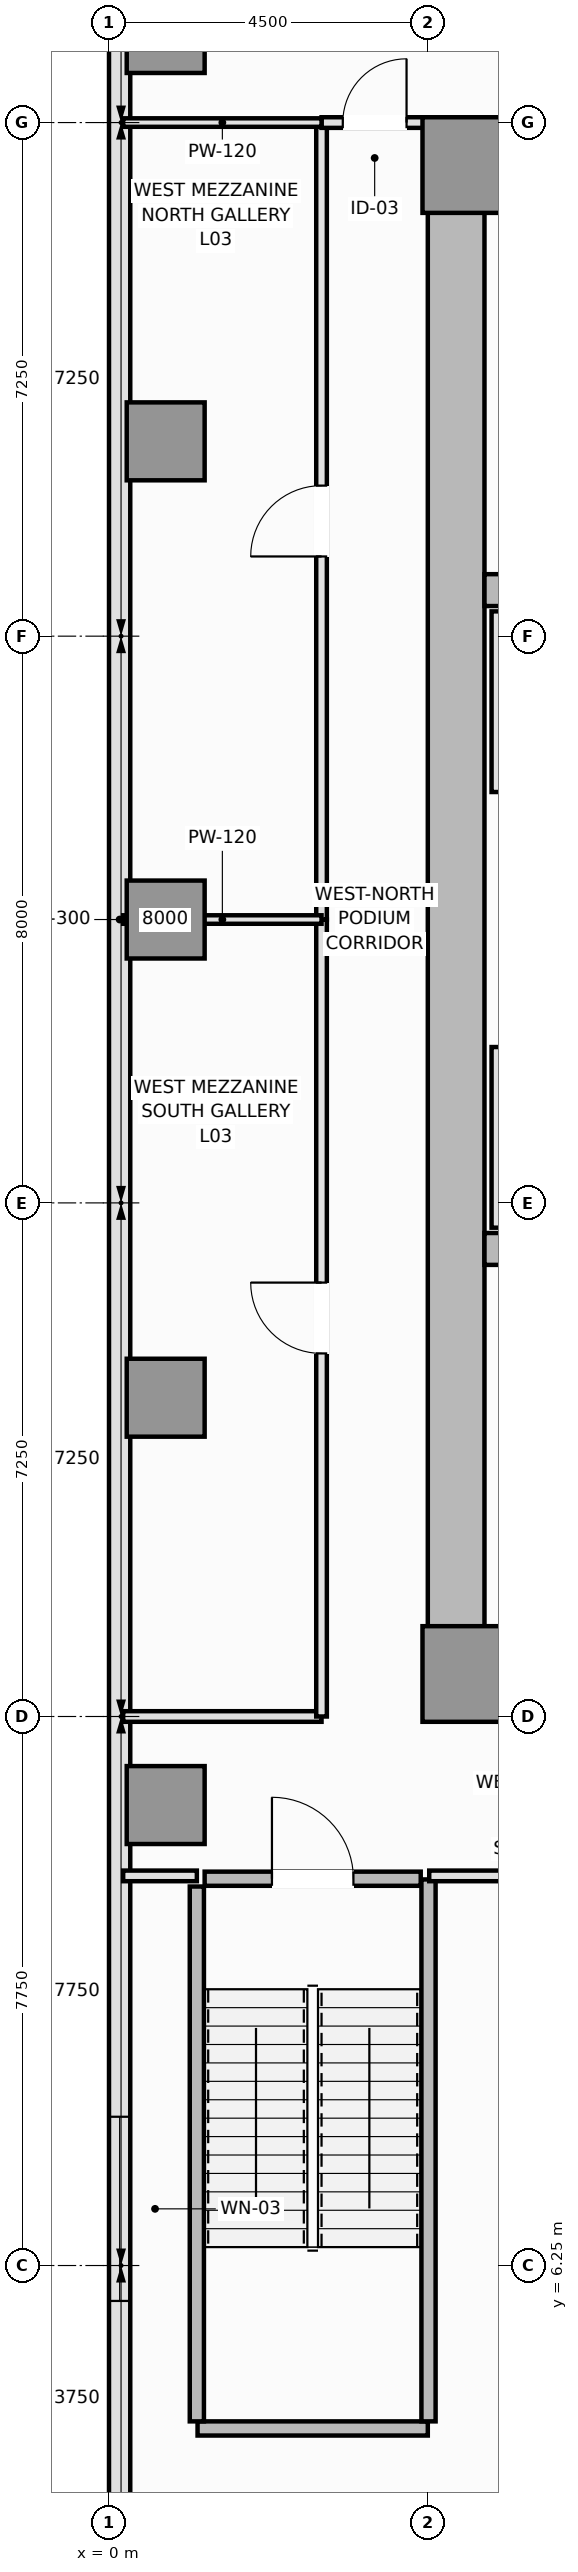
"""IFC4 building model, lengths in metres.
Left out: names, types, materials, properties, quantities, classifications, styles, units other than length and angle.
Written with IfcOpenShell. Run it as: python <this file> out.ifc"""

import sys

from ifc_helpers import new_model, si_unit, direction, frame, frame_2d, origin, origin_2d, place, context, subcontext, project, spatial, rectangle, extrude, element, fill, save


model = new_model("IFC4")
c1 = context("Model", 3, precision=1e-05, world=origin(), true_north=direction((0.0, 1.0)))
c2 = subcontext(c1, "Body", "Model", "MODEL_VIEW")
j1 = project(units=[si_unit("LENGTHUNIT", "METRE"), si_unit("PLANEANGLEUNIT", "RADIAN")], contexts=[c1])
p1 = place(None, origin())
s1 = spatial("IfcSite", under=j1, at=p1, CompositionType="ELEMENT")
p2 = place(p1, origin())
s2 = spatial("IfcBuilding", under=s1, at=p2, CompositionType="ELEMENT")
p3 = place(p2, frame((0.0, 0.0, 15.6)))
s3 = spatial("IfcBuildingStorey", under=s2, at=p3, CompositionType="ELEMENT", Elevation=15.6)
for number, where, z_axis, x_axis in (
    (1, (4.5, 14.4, 0.0), (0.0, 0.0, 1.0), (1.0, 0.0, 0.0)),
    (2, (4.5, 36.1, 0.0), (0.0, 0.0, 1.0), (1.0, 0.0, 0.0)),
):
    element("IfcWall", number, at=place(p3, frame(where, z_axis=z_axis, x_axis=x_axis)), inside=s3, PredefinedType="SHEAR", context=c2, shape_type="SweptSolid", body=[
        extrude(rectangle(XDim=13.5, YDim=0.8, at=frame_2d((6.75, 0.0))), origin(), (0.0, 0.0, 1.0), 4.8),
    ])
p4 = place(p3, frame((4.9, 14.8, 0.0), z_axis=(0.0, 0.0, 1.0), x_axis=(0.0, 1.0, 0.0)))
e3 = element("IfcWall", 3, at=p4, inside=s3, PredefinedType="SHEAR", context=c2, shape_type="SweptSolid", body=[
    extrude(rectangle(XDim=20.9, YDim=0.8, at=frame_2d((10.45, 0.0))), origin(), (0.0, 0.0, 1.0), 4.8),
])
for number, where, z_axis, x_axis in (
    (4, (5.3, 20.6, 0.0), (0.0, 0.0, 1.0), (1.0, 0.0, 0.0)),
    (5, (5.3, 29.9, 0.0), (0.0, 0.0, 1.0), (1.0, 0.0, 0.0)),
):
    element("IfcWall", number, at=place(p3, frame(where, z_axis=z_axis, x_axis=x_axis)), inside=s3, PredefinedType="SHEAR", context=c2, shape_type="SweptSolid", body=[
        extrude(rectangle(XDim=11.9, YDim=0.45, at=frame_2d((5.95, 0.0))), origin(), (0.0, 0.0, 1.0), 4.8),
    ])
for number, where, z_axis, x_axis in (
    (6, (5.1, 14.6, 0.0), (0.0, 0.0, 1.0), (1.0, 0.0, 0.0)),
    (7, (5.1, 35.9, 0.0), (0.0, 0.0, 1.0), (1.0, 0.0, 0.0)),
):
    element("IfcColumn", number, at=place(p3, frame(where, z_axis=z_axis, x_axis=x_axis)), inside=s3, PredefinedType="PILASTER", context=c2, shape_type="SweptSolid", body=[
        extrude(rectangle(XDim=1.35, YDim=1.35, at=origin_2d()), origin(), (0.0, 0.0, 1.0), 4.8),
    ])
for number, where, z_axis, x_axis in (
    (8, (0.8, 12.75, 0.0), (0.0, 0.0, 1.0), (1.0, 0.0, 0.0)),
    (9, (0.8, 18.5, 0.0), (0.0, 0.0, 1.0), (1.0, 0.0, 0.0)),
    (10, (0.8, 25.25, 0.0), (0.0, 0.0, 1.0), (1.0, 0.0, 0.0)),
    (11, (0.8, 32.0, 0.0), (0.0, 0.0, 1.0), (1.0, 0.0, 0.0)),
    (12, (0.8, 37.75, 0.0), (0.0, 0.0, 1.0), (1.0, 0.0, 0.0)),
):
    element("IfcColumn", number, at=place(p3, frame(where, z_axis=z_axis, x_axis=x_axis)), inside=s3, PredefinedType="COLUMN", context=c2, shape_type="SweptSolid", body=[
        extrude(rectangle(XDim=1.1, YDim=1.1, at=origin_2d()), origin(), (0.0, 0.0, 1.0), 4.8),
    ])
p5 = place(p3, frame((0.15, 50.35, 0.0), z_axis=(0.0, 0.0, 1.0), x_axis=(0.0, -1.0, 0.0)))
e13 = element("IfcWall", 13, at=p5, inside=s3, PredefinedType="SOLIDWALL", context=c2, shape_type="SweptSolid", body=[
    extrude(rectangle(XDim=50.2, YDim=0.3, at=frame_2d((25.1, 0.0))), origin(), (0.0, 0.0, 1.0), 4.6),
])
p6 = place(p5, frame((6.5, 0.0, 0.9)))
e14 = element("IfcOpeningElement", 14, at=p6, cuts=e13, PredefinedType="OPENING", context=c2, shape_type="SweptSolid", body=[
    extrude(rectangle(XDim=2.6, YDim=2.2, at=frame_2d((1.3, 1.1))), frame((0.0, 0.16, 0.0), z_axis=(0.0, -1.0, 0.0), x_axis=(1.0, 0.0, 0.0)), (0.0, 0.0, 1.0), 0.32),
])
p7 = place(p5, frame((42.0, 0.0, 0.9)))
e15 = element("IfcOpeningElement", 15, at=p7, cuts=e13, PredefinedType="OPENING", context=c2, shape_type="SweptSolid", body=[
    extrude(rectangle(XDim=2.6, YDim=2.2, at=frame_2d((1.3, 1.1))), frame((0.0, 0.16, 0.0), z_axis=(0.0, -1.0, 0.0), x_axis=(1.0, 0.0, 0.0)), (0.0, 0.0, 1.0), 0.32),
])
p8 = place(p3, frame((1.25, 3.95, 0.0), z_axis=(0.0, 0.0, 1.0), x_axis=(1.0, 0.0, 0.0)))
e16 = element("IfcWall", 16, at=p8, inside=s3, PredefinedType="SOLIDWALL", context=c2, shape_type="SweptSolid", body=[
    extrude(rectangle(XDim=3.25, YDim=0.2, at=frame_2d((1.625, 0.0))), origin(), (0.0, 0.0, 1.0), 4.8),
])
p9 = place(p3, frame((1.24, 4.05, 0.0), z_axis=(0.0, 0.0, 1.0), x_axis=(0.0, 1.0, 0.0)))
e17 = element("IfcWall", 17, at=p9, inside=s3, PredefinedType="SOLIDWALL", context=c2, shape_type="SweptSolid", body=[
    extrude(rectangle(XDim=7.55, YDim=0.2, at=frame_2d((3.775, 0.0))), origin(), (0.0, 0.0, 1.0), 4.8),
])
p10 = place(p3, frame((4.51, 4.05, 0.0), z_axis=(0.0, 0.0, 1.0), x_axis=(0.0, 1.0, 0.0)))
e18 = element("IfcWall", 18, at=p10, inside=s3, PredefinedType="SOLIDWALL", context=c2, shape_type="SweptSolid", body=[
    extrude(rectangle(XDim=7.65, YDim=0.2, at=frame_2d((3.825, 0.0))), origin(), (0.0, 0.0, 1.0), 4.8),
])
p11 = place(p3, frame((1.35, 11.71, 0.0), z_axis=(0.0, 0.0, 1.0), x_axis=(1.0, 0.0, 0.0)))
e19 = element("IfcWall", 19, at=p11, inside=s3, PredefinedType="SOLIDWALL", context=c2, shape_type="SweptSolid", body=[
    extrude(rectangle(XDim=3.05, YDim=0.2, at=frame_2d((1.525, 0.0))), origin(), (0.0, 0.0, 1.0), 4.8),
])
p12 = place(p11, frame((0.95, 0.0, 0.0)))
e20 = element("IfcOpeningElement", 20, at=p12, cuts=e19, PredefinedType="OPENING", context=c2, shape_type="SweptSolid", body=[
    extrude(rectangle(XDim=1.15, YDim=2.15, at=frame_2d((0.575, 1.075))), frame((0.0, 0.11, 0.0), z_axis=(0.0, -1.0, 0.0), x_axis=(1.0, 0.0, 0.0)), (0.0, 0.0, 1.0), 0.22),
])
for number, where, z_axis, x_axis in (
    (21, (5.475, 20.9, 0.0), (0.0, 0.0, 1.0), (0.0, 1.0, 0.0)),
    (22, (5.475, 27.05, 0.0), (0.0, 0.0, 1.0), (0.0, 1.0, 0.0)),
):
    element("IfcWall", number, at=place(p3, frame(where, z_axis=z_axis, x_axis=x_axis)), inside=s3, PredefinedType="PARTITIONING", context=c2, shape_type="SweptSolid", body=[
        extrude(rectangle(XDim=2.55, YDim=0.15, at=frame_2d((1.275, 0.0))), origin(), (0.0, 0.0, 1.0), 4.6),
    ])
p13 = place(p3, frame((0.2, 11.75, 0.0), z_axis=(0.0, 0.0, 1.0), x_axis=(1.0, 0.0, 0.0)))
e23 = element("IfcWall", 23, at=p13, inside=s3, PredefinedType="PARTITIONING", context=c2, shape_type="SweptSolid", body=[
    extrude(rectangle(XDim=1.04, YDim=0.15, at=frame_2d((0.52, 0.0))), origin(), (0.0, 0.0, 1.0), 4.6),
])
p14 = place(p3, frame((4.52, 11.75, 0.0), z_axis=(0.0, 0.0, 1.0), x_axis=(1.0, 0.0, 0.0)))
e24 = element("IfcWall", 24, at=p14, inside=s3, PredefinedType="PARTITIONING", context=c2, shape_type="SweptSolid", body=[
    extrude(rectangle(XDim=16.73, YDim=0.15, at=frame_2d((8.365, 0.0))), origin(), (0.0, 0.0, 1.0), 4.6),
])
p15 = place(p14, frame((7.94, 0.0, 0.0)))
e25 = element("IfcOpeningElement", 25, at=p15, cuts=e24, PredefinedType="OPENING", context=c2, shape_type="SweptSolid", body=[
    extrude(rectangle(XDim=1.0, YDim=2.15, at=frame_2d((0.5, 1.075))), frame((0.0, 0.085, 0.0), z_axis=(0.0, -1.0, 0.0), x_axis=(1.0, 0.0, 0.0)), (0.0, 0.0, 1.0), 0.17),
])
p16 = place(p3, frame((0.2, 14.0, 0.0), z_axis=(0.0, 0.0, 1.0), x_axis=(1.0, 0.0, 0.0)))
e26 = element("IfcWall", 26, at=p16, inside=s3, PredefinedType="PARTITIONING", context=c2, shape_type="SweptSolid", body=[
    extrude(rectangle(XDim=2.8, YDim=0.15, at=frame_2d((1.4, 0.0))), origin(), (0.0, 0.0, 1.0), 4.6),
])
p17 = place(p3, frame((3.0, 14.0, 0.0), z_axis=(0.0, 0.0, 1.0), x_axis=(0.0, 1.0, 0.0)))
e27 = element("IfcWall", 27, at=p17, inside=s3, PredefinedType="PARTITIONING", context=c2, shape_type="SweptSolid", body=[
    extrude(rectangle(XDim=11.25, YDim=0.15, at=frame_2d((5.625, 0.0))), origin(), (0.0, 0.0, 1.0), 4.6),
])
p18 = place(p17, frame((5.125, 0.0, 0.0)))
e28 = element("IfcOpeningElement", 28, at=p18, cuts=e27, PredefinedType="OPENING", context=c2, shape_type="SweptSolid", body=[
    extrude(rectangle(XDim=1.0, YDim=2.15, at=frame_2d((0.5, 1.075))), frame((0.0, 0.085, 0.0), z_axis=(0.0, -1.0, 0.0), x_axis=(1.0, 0.0, 0.0)), (0.0, 0.0, 1.0), 0.17),
])
p19 = place(p3, frame((3.0, 25.25, 0.0), z_axis=(0.0, 0.0, 1.0), x_axis=(0.0, 1.0, 0.0)))
e29 = element("IfcWall", 29, at=p19, inside=s3, PredefinedType="PARTITIONING", context=c2, shape_type="SweptSolid", body=[
    extrude(rectangle(XDim=11.25, YDim=0.15, at=frame_2d((5.625, 0.0))), origin(), (0.0, 0.0, 1.0), 4.6),
])
p20 = place(p19, frame((5.125, 0.0, 0.0)))
e30 = element("IfcOpeningElement", 30, at=p20, cuts=e29, PredefinedType="OPENING", context=c2, shape_type="SweptSolid", body=[
    extrude(rectangle(XDim=1.0, YDim=2.15, at=frame_2d((0.5, 1.075))), frame((0.0, 0.085, 0.0), z_axis=(0.0, -1.0, 0.0), x_axis=(1.0, 0.0, 0.0)), (0.0, 0.0, 1.0), 0.17),
])
p21 = place(p3, frame((3.0, 36.5, 0.0), z_axis=(0.0, 0.0, 1.0), x_axis=(1.0, 0.0, 0.0)))
e31 = element("IfcWall", 31, at=p21, inside=s3, PredefinedType="PARTITIONING", context=c2, shape_type="SweptSolid", body=[
    extrude(rectangle(XDim=1.5, YDim=0.15, at=frame_2d((0.75, 0.0))), origin(), (0.0, 0.0, 1.0), 4.6),
])
p22 = place(p21, frame((0.3, 0.0, 0.0)))
e32 = element("IfcOpeningElement", 32, at=p22, cuts=e31, PredefinedType="OPENING", context=c2, shape_type="SweptSolid", body=[
    extrude(rectangle(XDim=0.9, YDim=2.1, at=frame_2d((0.45, 1.05))), frame((0.0, 0.085, 0.0), z_axis=(0.0, -1.0, 0.0), x_axis=(1.0, 0.0, 0.0)), (0.0, 0.0, 1.0), 0.17),
])
p23 = place(p3, frame((0.2, 25.25, 0.0), z_axis=(0.0, 0.0, 1.0), x_axis=(1.0, 0.0, 0.0)))
e33 = element("IfcWall", 33, at=p23, inside=s3, PredefinedType="PARTITIONING", context=c2, shape_type="SweptSolid", body=[
    extrude(rectangle(XDim=2.8, YDim=0.12, at=frame_2d((1.4, 0.0))), origin(), (0.0, 0.0, 1.0), 3.8),
])
p24 = place(p3, frame((0.2, 36.5, 0.0), z_axis=(0.0, 0.0, 1.0), x_axis=(1.0, 0.0, 0.0)))
e34 = element("IfcWall", 34, at=p24, inside=s3, PredefinedType="PARTITIONING", context=c2, shape_type="SweptSolid", body=[
    extrude(rectangle(XDim=2.8, YDim=0.12, at=frame_2d((1.4, 0.0))), origin(), (0.0, 0.0, 1.0), 4.6),
])
p25 = place(p7, origin())
e35 = element("IfcWindow", 35, at=p25, inside=s3, PartitioningType="SINGLE_PANEL", PredefinedType="WINDOW", context=c2, shape_type="SweptSolid", body=[
    extrude(rectangle(XDim=2.6, YDim=2.2, at=frame_2d((1.3, 1.1))), frame((0.0, 0.03, 0.0), z_axis=(0.0, -1.0, 0.0), x_axis=(1.0, 0.0, 0.0)), (0.0, 0.0, 1.0), 0.06),
])
fill(e15, e35)
p26 = place(p12, origin())
e36 = element("IfcDoor", 36, at=p26, inside=s3, OperationType="SINGLE_SWING_LEFT", PredefinedType="DOOR", context=c2, shape_type="SweptSolid", body=[
    extrude(rectangle(XDim=1.15, YDim=2.15, at=frame_2d((0.575, 1.075))), frame((0.0, 0.025, 0.0), z_axis=(0.0, -1.0, 0.0), x_axis=(1.0, 0.0, 0.0)), (0.0, 0.0, 1.0), 0.05),
])
fill(e20, e36)
p27 = place(p18, origin())
e37 = element("IfcDoor", 37, at=p27, inside=s3, OperationType="SINGLE_SWING_RIGHT", PredefinedType="DOOR", context=c2, shape_type="SweptSolid", body=[
    extrude(rectangle(XDim=1.0, YDim=2.15, at=frame_2d((0.5, 1.075))), frame((0.0, 0.025, 0.0), z_axis=(0.0, -1.0, 0.0), x_axis=(1.0, 0.0, 0.0)), (0.0, 0.0, 1.0), 0.05),
])
fill(e28, e37)
p28 = place(p20, origin())
e38 = element("IfcDoor", 38, at=p28, inside=s3, OperationType="SINGLE_SWING_LEFT", PredefinedType="DOOR", context=c2, shape_type="SweptSolid", body=[
    extrude(rectangle(XDim=1.0, YDim=2.15, at=frame_2d((0.5, 1.075))), frame((0.0, 0.025, 0.0), z_axis=(0.0, -1.0, 0.0), x_axis=(1.0, 0.0, 0.0)), (0.0, 0.0, 1.0), 0.05),
])
fill(e30, e38)
p29 = place(p22, origin())
e39 = element("IfcDoor", 39, at=p29, inside=s3, OperationType="SINGLE_SWING_RIGHT", PredefinedType="DOOR", context=c2, shape_type="SweptSolid", body=[
    extrude(rectangle(XDim=0.9, YDim=2.1, at=frame_2d((0.45, 1.05))), frame((0.0, 0.025, 0.0), z_axis=(0.0, -1.0, 0.0), x_axis=(1.0, 0.0, 0.0)), (0.0, 0.0, 1.0), 0.05),
])
fill(e32, e39)
save(model, sys.argv[1])
